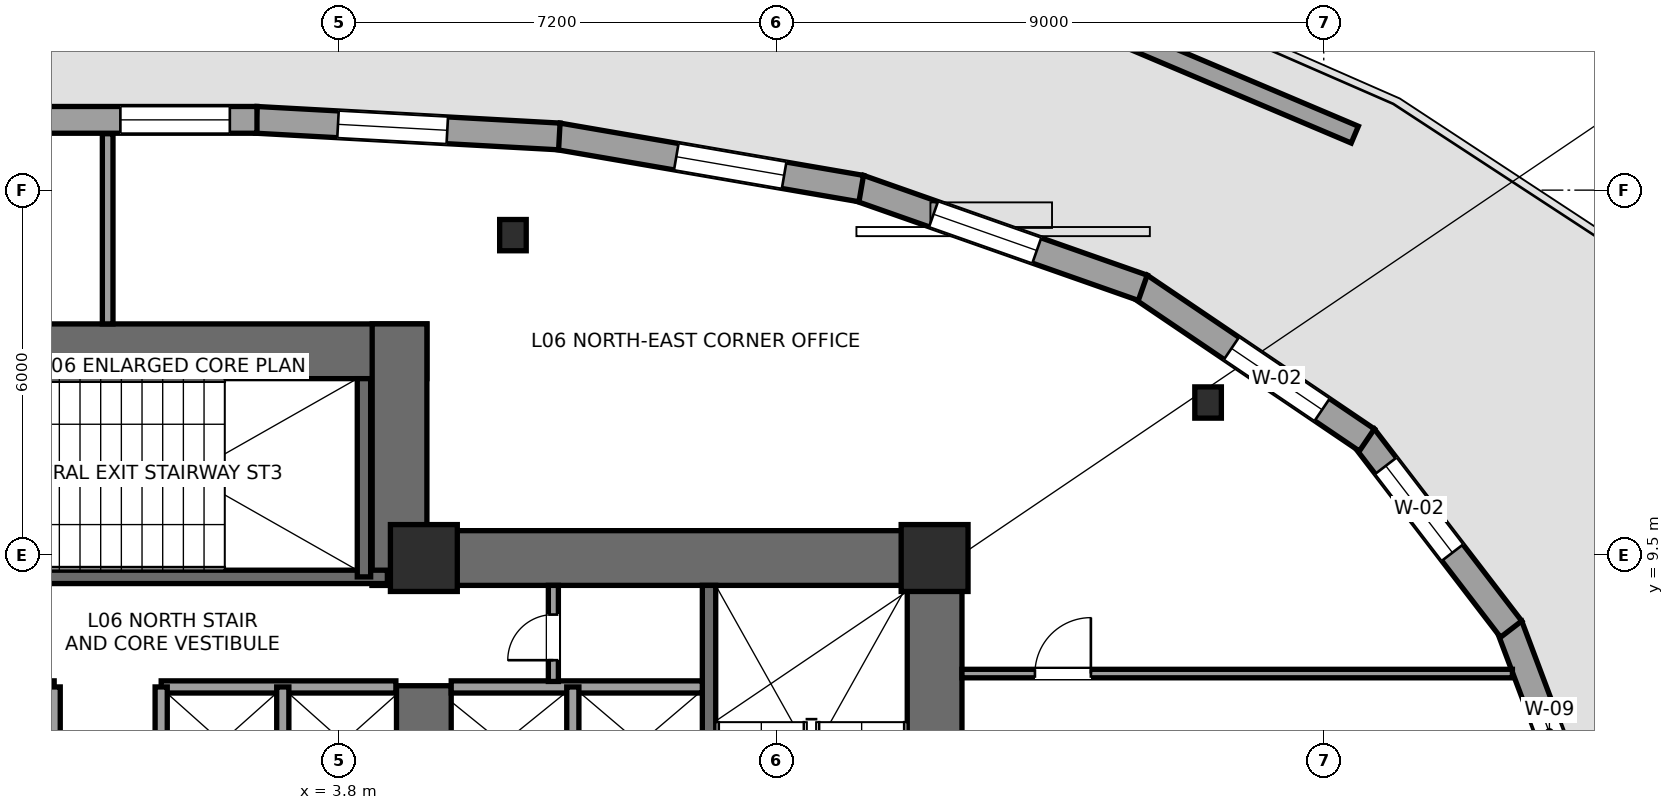
"""IFC4 building model, lengths in metres.
Left out: names, types, materials, properties, quantities, classifications, styles, units other than length and angle.
Written with IfcOpenShell. Run it as: python <this file> out.ifc"""

import sys

from ifc_helpers import new_model, si_unit, direction, frame, frame_2d, origin, origin_2d, place, context, subcontext, project, spatial, rectangle, i_section, extrude, element, fill, save


model = new_model("IFC4")
c1 = context("Model", 3, precision=1e-05, world=origin(), true_north=direction((0.0, 1.0)))
c2 = subcontext(c1, "Body", "Model", "MODEL_VIEW")
j1 = project(units=[si_unit("LENGTHUNIT", "METRE"), si_unit("PLANEANGLEUNIT", "RADIAN")], contexts=[c1])
p1 = place(None, origin())
s1 = spatial("IfcSite", under=j1, at=p1, CompositionType="ELEMENT")
p2 = place(p1, origin())
s2 = spatial("IfcBuilding", under=s1, at=p2, CompositionType="ELEMENT")
p3 = place(p2, frame((0.0, 0.0, 27.0)))
s3 = spatial("IfcBuildingStorey", under=s2, at=p3, CompositionType="ELEMENT", Elevation=27.0)
p4 = place(p3, frame((13.6, 0.95, 0.0), z_axis=(0.0, 0.0, 1.0), x_axis=(0.0, 1.0, 0.0)))
e1 = element("IfcWall", 1, at=p4, inside=s3, PredefinedType="SHEAR", context=c2, shape_type="SweptSolid", body=[
    extrude(rectangle(XDim=8.95, YDim=0.9, at=frame_2d((4.475, 0.0))), origin(), (0.0, 0.0, 1.0), 3.6),
])
p5 = place(p3, frame((4.35, 9.45, 0.0), z_axis=(0.0, 0.0, 1.0), x_axis=(1.0, 0.0, 0.0)))
e2 = element("IfcWall", 2, at=p5, inside=s3, PredefinedType="SHEAR", context=c2, shape_type="SweptSolid", body=[
    extrude(rectangle(XDim=9.7, YDim=0.9, at=frame_2d((4.85, 0.0))), origin(), (0.0, 0.0, 1.0), 3.6),
])
p6 = place(p3, frame((5.2, 5.35, 0.0), z_axis=(0.0, 0.0, 1.0), x_axis=(0.0, 1.0, 0.0)))
e3 = element("IfcWall", 3, at=p6, inside=s3, PredefinedType="SHEAR", context=c2, shape_type="SweptSolid", body=[
    extrude(rectangle(XDim=2.0, YDim=0.9, at=frame_2d((1.0, 0.0))), origin(), (0.0, 0.0, 1.0), 3.6),
])
p7 = place(p3, frame((9.89, 1.85, 0.0), z_axis=(0.0, 0.0, 1.0), x_axis=(0.0, 1.0, 0.0)))
e4 = element("IfcWall", 4, at=p7, inside=s3, PredefinedType="SHEAR", context=c2, shape_type="SweptSolid", body=[
    extrude(rectangle(XDim=7.15, YDim=0.22, at=frame_2d((3.575, 0.0))), origin(), (0.0, 0.0, 1.0), 3.6),
])
p8 = place(p3, frame((-5.25, 12.85, 0.0), z_axis=(0.0, 0.0, 1.0), x_axis=(1.0, 0.0, 0.0)))
e5 = element("IfcWall", 5, at=p8, inside=s3, PredefinedType="SHEAR", context=c2, shape_type="SweptSolid", body=[
    extrude(rectangle(XDim=10.5, YDim=0.9, at=frame_2d((5.25, 0.0))), origin(), (0.0, 0.0, 1.0), 3.6),
])
p9 = place(p3, frame((4.8, 9.0, 0.0), z_axis=(0.0, 0.0, 1.0), x_axis=(0.0, 1.0, 0.0)))
e6 = element("IfcWall", 6, at=p9, inside=s3, PredefinedType="SHEAR", context=c2, shape_type="SweptSolid", body=[
    extrude(rectangle(XDim=4.3, YDim=0.9, at=frame_2d((2.15, 0.0))), origin(), (0.0, 0.0, 1.0), 3.6),
])
p10 = place(p3, frame((-4.7, 9.14, 0.0), z_axis=(0.0, 0.0, 1.0), x_axis=(1.0, 0.0, 0.0)))
e7 = element("IfcWall", 7, at=p10, inside=s3, PredefinedType="SHEAR", context=c2, shape_type="SweptSolid", body=[
    extrude(rectangle(XDim=9.3, YDim=0.22, at=frame_2d((4.65, 0.0))), origin(), (0.0, 0.0, 1.0), 3.6),
])
p11 = place(p10, frame((1.15, 0.0, 0.0)))
e8 = element("IfcOpeningElement", 8, at=p11, cuts=e7, PredefinedType="OPENING", context=c2, shape_type="SweptSolid", body=[
    extrude(rectangle(XDim=1.05, YDim=2.15, at=frame_2d((0.525, 1.075))), frame((0.0, 0.12, 0.0), z_axis=(0.0, -1.0, 0.0), x_axis=(1.0, 0.0, 0.0)), (0.0, 0.0, 1.0), 0.24),
])
p12 = place(p3, frame((4.215, 9.14, 0.0), z_axis=(0.0, 0.0, 1.0), x_axis=(0.0, 1.0, 0.0)))
e9 = element("IfcWall", 9, at=p12, inside=s3, PredefinedType="SHEAR", context=c2, shape_type="SweptSolid", body=[
    extrude(rectangle(XDim=3.26, YDim=0.22, at=frame_2d((1.63, 0.0))), origin(), (0.0, 0.0, 1.0), 3.6),
])
for number, where, z_axis, x_axis in (
    (10, (5.2, 9.45, 0.0), (0.0, 0.0, 1.0), (1.0, 0.0, 0.0)),
    (11, (13.6, 9.45, 0.0), (0.0, 0.0, 1.0), (1.0, 0.0, 0.0)),
):
    element("IfcColumn", number, at=place(p3, frame(where, z_axis=z_axis, x_axis=x_axis)), inside=s3, PredefinedType="COLUMN", context=c2, shape_type="SweptSolid", body=[
        extrude(rectangle(XDim=1.1, YDim=1.1, at=origin_2d()), origin(), (0.0, 0.0, 1.0), 3.6),
    ])
for number, where, z_axis, x_axis in (
    (12, (18.098, 12.007, 0.0), (0.0, 0.0, 1.0), (1.0, 0.0, 0.0)),
    (13, (6.665, 14.76, 0.0), (0.0, 0.0, 1.0), (1.0, 0.0, 0.0)),
):
    element("IfcColumn", number, at=place(p3, frame(where, z_axis=z_axis, x_axis=x_axis)), inside=s3, PredefinedType="COLUMN", context=c2, shape_type="SweptSolid", body=[
        extrude(i_section(OverallWidth=0.437, OverallDepth=0.514, WebThickness=0.061, FlangeThickness=0.097, at=origin_2d()), origin(), (0.0, 0.0, 1.0), 3.6),
    ])
p13 = place(p3, frame((23.05, 8.337, 0.0), z_axis=(0.0, 0.0, 1.0), x_axis=(0.351960996761, -0.936014666957, 0.0)))
e14 = element("IfcWall", 14, at=p13, inside=s3, PredefinedType="STANDARD", context=c2, shape_type="SweptSolid", body=[
    extrude(rectangle(XDim=3.609, YDim=0.44, at=frame_2d((1.805, 0.0))), origin(), (0.0, 0.0, 1.0), 2.533),
])
p14 = place(p13, frame((1.428, 0.0, 0.58)))
e15 = element("IfcOpeningElement", 15, at=p14, cuts=e14, PredefinedType="OPENING", context=c2, shape_type="SweptSolid", body=[
    extrude(rectangle(XDim=0.9, YDim=1.35, at=frame_2d((0.45, 0.675))), frame((0.0, 0.23, 0.0), z_axis=(0.0, -1.0, 0.0), x_axis=(1.0, 0.0, 0.0)), (0.0, 0.0, 1.0), 0.46),
])
p15 = place(p3, frame((20.658, 11.439, 0.0), z_axis=(0.0, 0.0, 1.0), x_axis=(0.608803527611, -0.793321035123, 0.0)))
e16 = element("IfcWall", 16, at=p15, inside=s3, PredefinedType="STANDARD", context=c2, shape_type="SweptSolid", body=[
    extrude(rectangle(XDim=3.981, YDim=0.44, at=frame_2d((1.991, 0.0))), origin(), (0.0, 0.0, 1.0), 2.533),
])
p16 = place(p15, frame((0.596, 0.0, 0.65)))
e17 = element("IfcOpeningElement", 17, at=p16, cuts=e16, PredefinedType="OPENING", context=c2, shape_type="SweptSolid", body=[
    extrude(rectangle(XDim=1.8, YDim=1.7, at=frame_2d((0.9, 0.85))), frame((0.0, 0.23, 0.0), z_axis=(0.0, -1.0, 0.0), x_axis=(1.0, 0.0, 0.0)), (0.0, 0.0, 1.0), 0.46),
])
p17 = place(p3, frame((16.973, 13.919, 0.0), z_axis=(0.0, 0.0, 1.0), x_axis=(0.828124546302, -0.560544142608, 0.0)))
e18 = element("IfcWall", 18, at=p17, inside=s3, PredefinedType="STANDARD", context=c2, shape_type="SweptSolid", body=[
    extrude(rectangle(XDim=4.511, YDim=0.44, at=frame_2d((2.255, 0.0))), origin(), (0.0, 0.0, 1.0), 2.533),
])
p18 = place(p17, frame((1.823, 0.0, 0.65)))
e19 = element("IfcOpeningElement", 19, at=p18, cuts=e18, PredefinedType="OPENING", context=c2, shape_type="SweptSolid", body=[
    extrude(rectangle(XDim=1.8, YDim=1.7, at=frame_2d((0.9, 0.85))), frame((0.0, 0.23, 0.0), z_axis=(0.0, -1.0, 0.0), x_axis=(1.0, 0.0, 0.0)), (0.0, 0.0, 1.0), 0.46),
])
p19 = place(p3, frame((12.358, 15.535, 0.0), z_axis=(0.0, 0.0, 1.0), x_axis=(0.94336246541, -0.331763860082, 0.0)))
e20 = element("IfcWall", 20, at=p19, inside=s3, PredefinedType="STANDARD", context=c2, shape_type="SweptSolid", body=[
    extrude(rectangle(XDim=4.946, YDim=0.44, at=frame_2d((2.473, 0.0))), origin(), (0.0, 0.0, 1.0), 2.529),
])
p20 = place(p19, frame((1.298, 0.0, 0.65)))
e21 = element("IfcOpeningElement", 21, at=p20, cuts=e20, PredefinedType="OPENING", context=c2, shape_type="SweptSolid", body=[
    extrude(rectangle(XDim=1.8, YDim=1.7, at=frame_2d((0.9, 0.85))), frame((0.0, 0.23, 0.0), z_axis=(0.0, -1.0, 0.0), x_axis=(1.0, 0.0, 0.0)), (0.0, 0.0, 1.0), 0.46),
])
p21 = place(p3, frame((7.403, 16.386, 0.0), z_axis=(0.0, 0.0, 1.0), x_axis=(0.985480149415, -0.169790680278, 0.0)))
e22 = element("IfcWall", 22, at=p21, inside=s3, PredefinedType="STANDARD", context=c2, shape_type="SweptSolid", body=[
    extrude(rectangle(XDim=5.064, YDim=0.44, at=frame_2d((2.532, 0.0))), origin(), (0.0, 0.0, 1.0), 2.533),
])
p22 = place(p21, frame((1.978, 0.0, 0.65)))
e23 = element("IfcOpeningElement", 23, at=p22, cuts=e22, PredefinedType="OPENING", context=c2, shape_type="SweptSolid", body=[
    extrude(rectangle(XDim=1.8, YDim=1.7, at=frame_2d((0.9, 0.85))), frame((0.0, 0.23, 0.0), z_axis=(0.0, -1.0, 0.0), x_axis=(1.0, 0.0, 0.0)), (0.0, 0.0, 1.0), 0.46),
])
p23 = place(p3, frame((2.443, 16.656, 0.0), z_axis=(0.0, 0.0, 1.0), x_axis=(0.998501456853, -0.054725137396, 0.0)))
e24 = element("IfcWall", 24, at=p23, inside=s3, PredefinedType="STANDARD", context=c2, shape_type="SweptSolid", body=[
    extrude(rectangle(XDim=4.992, YDim=0.44, at=frame_2d((2.496, 0.0))), origin(), (0.0, 0.0, 1.0), 2.533),
])
p24 = place(p23, frame((1.347, 0.0, 0.65)))
e25 = element("IfcOpeningElement", 25, at=p24, cuts=e24, PredefinedType="OPENING", context=c2, shape_type="SweptSolid", body=[
    extrude(rectangle(XDim=1.8, YDim=1.7, at=frame_2d((0.9, 0.85))), frame((0.0, 0.23, 0.0), z_axis=(0.0, -1.0, 0.0), x_axis=(1.0, 0.0, 0.0)), (0.0, 0.0, 1.0), 0.46),
])
p25 = place(p3, frame((-2.455, 16.656, 0.0), z_axis=(0.0, 0.0, 1.0), x_axis=(1.0, 0.0, 0.0)))
e26 = element("IfcWall", 26, at=p25, inside=s3, PredefinedType="STANDARD", context=c2, shape_type="SweptSolid", body=[
    extrude(rectangle(XDim=4.911, YDim=0.44, at=frame_2d((2.455, 0.0))), origin(), (0.0, 0.0, 1.0), 2.533),
])
p26 = place(p25, frame((2.664, 0.0, 0.65)))
e27 = element("IfcOpeningElement", 27, at=p26, cuts=e26, PredefinedType="OPENING", context=c2, shape_type="SweptSolid", body=[
    extrude(rectangle(XDim=1.8, YDim=1.7, at=frame_2d((0.9, 0.85))), frame((0.0, 0.23, 0.0), z_axis=(0.0, -1.0, 0.0), x_axis=(1.0, 0.0, 0.0)), (0.0, 0.0, 1.0), 0.46),
])
p27 = place(p3, frame((20.51, 16.413, 0.0), z_axis=(0.0, 0.0, 1.0), x_axis=(-0.92078980582, 0.390059141026, 0.0)))
e28 = element("IfcWall", 28, at=p27, inside=s3, PredefinedType="PARAPET", context=c2, shape_type="SweptSolid", body=[
    extrude(rectangle(XDim=5.776, YDim=0.3, at=frame_2d((2.888, 0.0))), origin(), (0.0, 0.0, 1.0), 0.45),
])
p28 = place(p3, frame((5.65, 7.33, 0.0), z_axis=(0.0, 0.0, 1.0), x_axis=(1.0, 0.0, 0.0)))
e29 = element("IfcWall", 29, at=p28, inside=s3, PredefinedType="SOLIDWALL", context=c2, shape_type="SweptSolid", body=[
    extrude(rectangle(XDim=4.13, YDim=0.2, at=frame_2d((2.065, 0.0))), origin(), (0.0, 0.0, 1.0), 3.4),
])
p29 = place(p3, frame((7.65, 5.47, 0.0), z_axis=(0.0, 0.0, 1.0), x_axis=(0.0, 1.0, 0.0)))
e30 = element("IfcWall", 30, at=p29, inside=s3, PredefinedType="SOLIDWALL", context=c2, shape_type="SweptSolid", body=[
    extrude(rectangle(XDim=1.86, YDim=0.2, at=frame_2d((0.93, 0.0))), origin(), (0.0, 0.0, 1.0), 3.4),
])
for number, where, z_axis, x_axis in (
    (31, (-4.74, 7.33, 0.0), (0.0, 0.0, 1.0), (1.0, 0.0, 0.0)),
    (32, (0.88, 7.33, 0.0), (0.0, 0.0, 1.0), (1.0, 0.0, 0.0)),
):
    element("IfcWall", number, at=place(p3, frame(where, z_axis=z_axis, x_axis=x_axis)), inside=s3, PredefinedType="SOLIDWALL", context=c2, shape_type="SweptSolid", body=[
        extrude(rectangle(XDim=3.86, YDim=0.2, at=frame_2d((1.93, 0.0))), origin(), (0.0, 0.0, 1.0), 3.4),
    ])
for number, where, z_axis, x_axis in (
    (33, (2.88, 5.52, 0.0), (0.0, 0.0, 1.0), (0.0, 1.0, 0.0)),
    (34, (-0.88, 5.52, 0.0), (0.0, 0.0, 1.0), (0.0, 1.0, 0.0)),
    (35, (0.88, 5.52, 0.0), (0.0, 0.0, 1.0), (0.0, 1.0, 0.0)),
):
    element("IfcWall", number, at=place(p3, frame(where, z_axis=z_axis, x_axis=x_axis)), inside=s3, PredefinedType="SOLIDWALL", context=c2, shape_type="SweptSolid", body=[
        extrude(rectangle(XDim=1.81, YDim=0.2, at=frame_2d((0.905, 0.0))), origin(), (0.0, 0.0, 1.0), 3.4),
    ])
p30 = place(p3, frame((7.33, 7.42, 0.0), z_axis=(0.0, 0.0, 1.0), x_axis=(0.0, 1.0, 0.0)))
e36 = element("IfcWall", 36, at=p30, inside=s3, PredefinedType="PARTITIONING", context=c2, shape_type="SweptSolid", body=[
    extrude(rectangle(XDim=1.58, YDim=0.165, at=frame_2d((0.79, 0.0))), origin(), (0.0, 0.0, 1.0), 3.4),
])
p31 = place(p30, frame((0.35, 0.0, 0.0)))
e37 = element("IfcOpeningElement", 37, at=p31, cuts=e36, PredefinedType="OPENING", context=c2, shape_type="SweptSolid", body=[
    extrude(rectangle(XDim=0.75, YDim=2.1, at=frame_2d((0.375, 1.05))), frame((0.0, 0.093, 0.0), z_axis=(0.0, -1.0, 0.0), x_axis=(1.0, 0.0, 0.0)), (0.0, 0.0, 1.0), 0.185),
])
p32 = place(p3, frame((14.05, 7.55, 0.0), z_axis=(0.0, 0.0, 1.0), x_axis=(1.0, 0.0, 0.0)))
e38 = element("IfcWall", 38, at=p32, inside=s3, PredefinedType="PARTITIONING", context=c2, shape_type="SweptSolid", body=[
    extrude(rectangle(XDim=9.052, YDim=0.14, at=frame_2d((4.526, 0.0))), origin(), (0.0, 0.0, 1.0), 3.4),
])
p33 = place(p32, frame((1.2, 0.0, 0.0)))
e39 = element("IfcOpeningElement", 39, at=p33, cuts=e38, PredefinedType="OPENING", context=c2, shape_type="SweptSolid", body=[
    extrude(rectangle(XDim=0.92, YDim=2.15, at=frame_2d((0.46, 1.075))), frame((0.0, 0.08, 0.0), z_axis=(0.0, -1.0, 0.0), x_axis=(1.0, 0.0, 0.0)), (0.0, 0.0, 1.0), 0.16),
])
p34 = place(p3, frame((0.0, 13.3, 0.0), z_axis=(0.0, 0.0, 1.0), x_axis=(0.0, 1.0, 0.0)))
e40 = element("IfcWall", 40, at=p34, inside=s3, PredefinedType="PARTITIONING", context=c2, shape_type="SweptSolid", body=[
    extrude(rectangle(XDim=3.128, YDim=0.175, at=frame_2d((1.564, 0.0))), origin(), (0.0, 0.0, 1.0), 3.4),
])
p35 = place(p14, origin())
e41 = element("IfcWindow", 41, at=p35, inside=s3, PartitioningType="SINGLE_PANEL", PredefinedType="WINDOW", context=c2, shape_type="SweptSolid", body=[
    extrude(rectangle(XDim=0.9, YDim=1.35, at=frame_2d((0.45, 0.675))), frame((0.0, -0.01, 0.0), z_axis=(0.0, -1.0, 0.0), x_axis=(1.0, 0.0, 0.0)), (0.0, 0.0, 1.0), 0.06),
])
fill(e15, e41)
p36 = place(p16, origin())
e42 = element("IfcWindow", 42, at=p36, inside=s3, PartitioningType="SINGLE_PANEL", PredefinedType="WINDOW", context=c2, shape_type="SweptSolid", body=[
    extrude(rectangle(XDim=1.8, YDim=1.7, at=frame_2d((0.9, 0.85))), frame((0.0, -0.01, 0.0), z_axis=(0.0, -1.0, 0.0), x_axis=(1.0, 0.0, 0.0)), (0.0, 0.0, 1.0), 0.06),
])
fill(e17, e42)
p37 = place(p18, origin())
e43 = element("IfcWindow", 43, at=p37, inside=s3, PartitioningType="SINGLE_PANEL", PredefinedType="WINDOW", context=c2, shape_type="SweptSolid", body=[
    extrude(rectangle(XDim=1.8, YDim=1.7, at=frame_2d((0.9, 0.85))), frame((0.0, -0.01, 0.0), z_axis=(0.0, -1.0, 0.0), x_axis=(1.0, 0.0, 0.0)), (0.0, 0.0, 1.0), 0.06),
])
fill(e19, e43)
p38 = place(p20, origin())
e44 = element("IfcWindow", 44, at=p38, inside=s3, PartitioningType="SINGLE_PANEL", PredefinedType="WINDOW", context=c2, shape_type="SweptSolid", body=[
    extrude(rectangle(XDim=1.8, YDim=1.7, at=frame_2d((0.9, 0.85))), frame((0.0, -0.01, 0.0), z_axis=(0.0, -1.0, 0.0), x_axis=(1.0, 0.0, 0.0)), (0.0, 0.0, 1.0), 0.06),
])
fill(e21, e44)
p39 = place(p22, origin())
e45 = element("IfcWindow", 45, at=p39, inside=s3, PartitioningType="SINGLE_PANEL", PredefinedType="WINDOW", context=c2, shape_type="SweptSolid", body=[
    extrude(rectangle(XDim=1.8, YDim=1.7, at=frame_2d((0.9, 0.85))), frame((0.0, -0.01, 0.0), z_axis=(0.0, -1.0, 0.0), x_axis=(1.0, 0.0, 0.0)), (0.0, 0.0, 1.0), 0.06),
])
fill(e23, e45)
p40 = place(p24, origin())
e46 = element("IfcWindow", 46, at=p40, inside=s3, PartitioningType="SINGLE_PANEL", PredefinedType="WINDOW", context=c2, shape_type="SweptSolid", body=[
    extrude(rectangle(XDim=1.8, YDim=1.7, at=frame_2d((0.9, 0.85))), frame((0.0, -0.01, 0.0), z_axis=(0.0, -1.0, 0.0), x_axis=(1.0, 0.0, 0.0)), (0.0, 0.0, 1.0), 0.06),
])
fill(e25, e46)
p41 = place(p26, origin())
e47 = element("IfcWindow", 47, at=p41, inside=s3, PartitioningType="SINGLE_PANEL", PredefinedType="WINDOW", context=c2, shape_type="SweptSolid", body=[
    extrude(rectangle(XDim=1.8, YDim=1.7, at=frame_2d((0.9, 0.85))), frame((0.0, -0.01, 0.0), z_axis=(0.0, -1.0, 0.0), x_axis=(1.0, 0.0, 0.0)), (0.0, 0.0, 1.0), 0.06),
])
fill(e27, e47)
p42 = place(p31, origin())
e48 = element("IfcDoor", 48, at=p42, inside=s3, OperationType="SINGLE_SWING_LEFT", PredefinedType="DOOR", context=c2, shape_type="SweptSolid", body=[
    extrude(rectangle(XDim=0.75, YDim=2.1, at=frame_2d((0.375, 1.05))), frame((0.0, 0.025, 0.0), z_axis=(0.0, -1.0, 0.0), x_axis=(1.0, 0.0, 0.0)), (0.0, 0.0, 1.0), 0.05),
])
fill(e37, e48)
p43 = place(p33, origin())
e49 = element("IfcDoor", 49, at=p43, inside=s3, OperationType="SINGLE_SWING_RIGHT", PredefinedType="DOOR", context=c2, shape_type="SweptSolid", body=[
    extrude(rectangle(XDim=0.92, YDim=2.15, at=frame_2d((0.46, 1.075))), frame((0.0, 0.025, 0.0), z_axis=(0.0, -1.0, 0.0), x_axis=(1.0, 0.0, 0.0)), (0.0, 0.0, 1.0), 0.05),
])
fill(e39, e49)
save(model, sys.argv[1])
